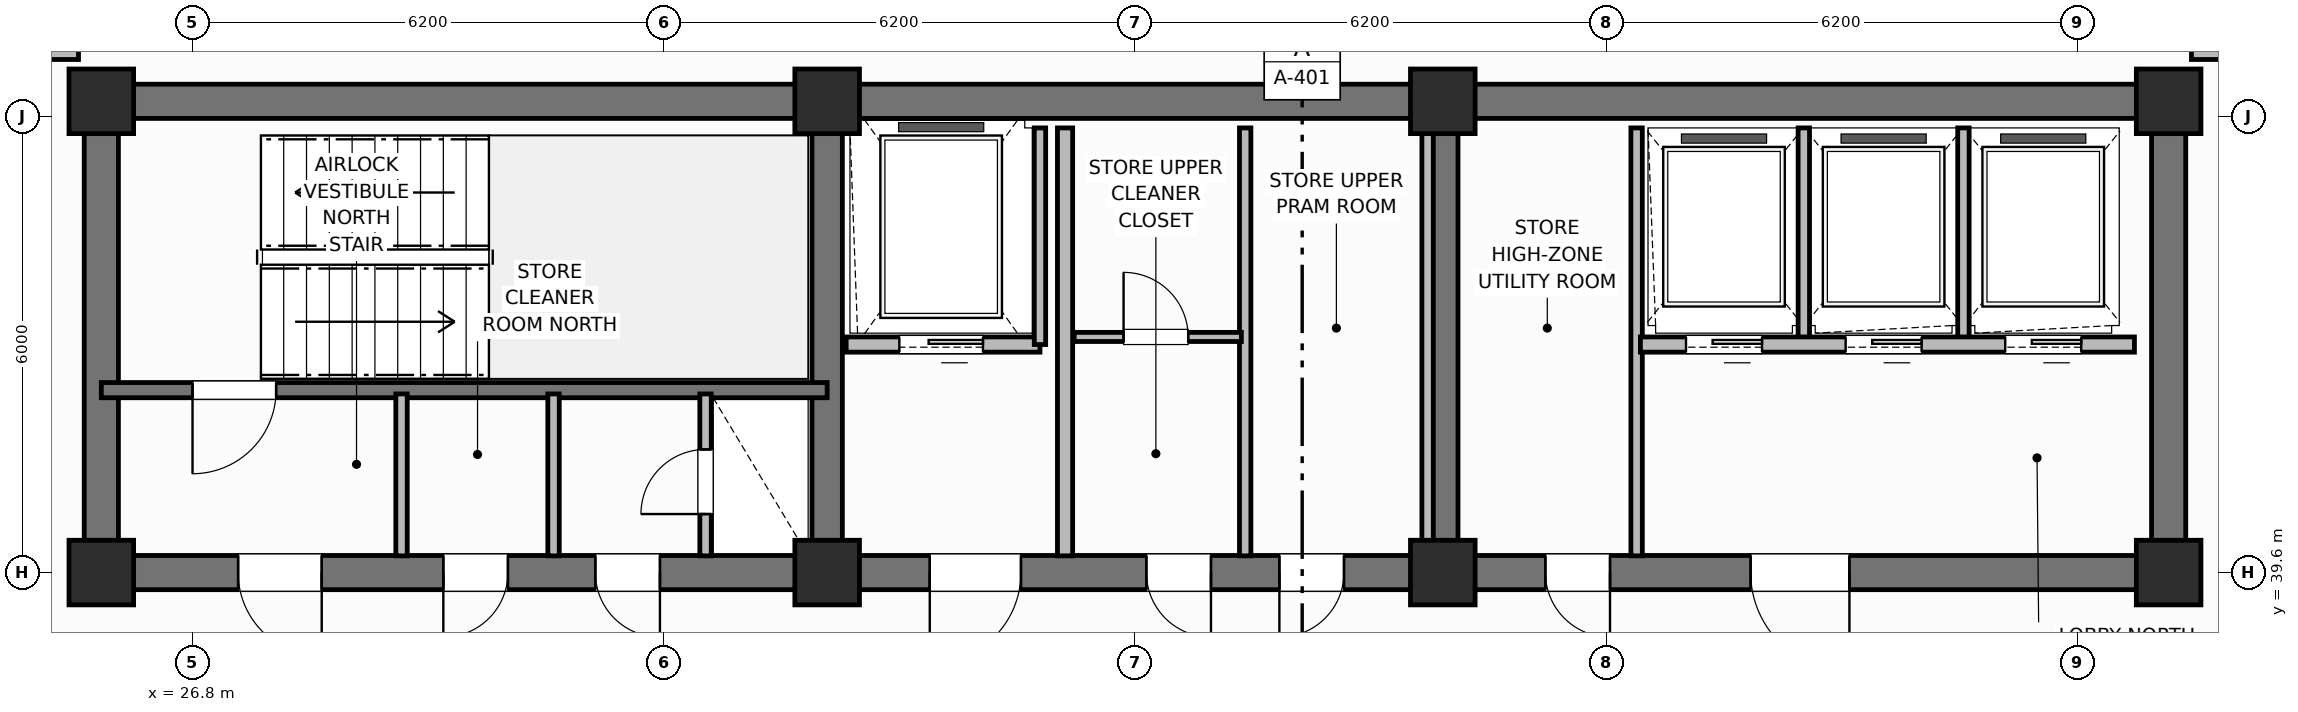
"""IFC4 building model, lengths in metres.
Left out: names, types, materials, properties, quantities, classifications, styles, units other than length and angle.
Written with IfcOpenShell. Run it as: python <this file> out.ifc"""

import sys

from ifc_helpers import new_model, si_unit, direction, frame, frame_2d, origin, origin_2d, place, context, subcontext, project, spatial, rectangle, extrude, element, fill, save


model = new_model("IFC4")
c1 = context("Model", 3, precision=1e-05, world=origin(), true_north=direction((0.0, 1.0)))
c2 = subcontext(c1, "Body", "Model", "MODEL_VIEW")
j1 = project(units=[si_unit("LENGTHUNIT", "METRE"), si_unit("PLANEANGLEUNIT", "RADIAN")], contexts=[c1])
p1 = place(None, origin())
s1 = spatial("IfcSite", under=j1, at=p1, CompositionType="ELEMENT")
p2 = place(p1, origin())
s2 = spatial("IfcBuilding", under=s1, at=p2, CompositionType="ELEMENT")
p3 = place(p2, frame((0.0, 0.0, 240.6)))
s3 = spatial("IfcBuildingStorey", under=s2, at=p3, CompositionType="ELEMENT", Elevation=240.6)
p4 = place(p3, frame((25.6, 45.8, 0.0), z_axis=(0.0, 0.0, 1.0), x_axis=(1.0, 0.0, 0.0)))
e1 = element("IfcWall", 1, at=p4, inside=s3, PredefinedType="SHEAR", context=c2, shape_type="SweptSolid", body=[
    extrude(rectangle(XDim=27.2, YDim=0.45, at=frame_2d((13.6, 0.0))), origin(), (0.0, 0.0, 1.0), 3.7),
])
for number, where, z_axis, x_axis in (
    (2, (25.6, 39.825, 0.0), (0.0, 0.0, 1.0), (0.0, 1.0, 0.0)),
    (3, (52.8, 39.825, 0.0), (0.0, 0.0, 1.0), (0.0, 1.0, 0.0)),
):
    element("IfcWall", number, at=place(p3, frame(where, z_axis=z_axis, x_axis=x_axis)), inside=s3, PredefinedType="SHEAR", context=c2, shape_type="SweptSolid", body=[
        extrude(rectangle(XDim=5.75, YDim=0.45, at=frame_2d((2.875, 0.0))), origin(), (0.0, 0.0, 1.0), 3.7),
    ])
p5 = place(p3, frame((52.8, 39.6, 0.0), z_axis=(0.0, 0.0, 1.0), x_axis=(-1.0, 0.0, 0.0)))
e4 = element("IfcWall", 4, at=p5, inside=s3, PredefinedType="SHEAR", context=c2, shape_type="SweptSolid", body=[
    extrude(rectangle(XDim=27.2, YDim=0.45, at=frame_2d((13.6, 0.0))), origin(), (0.0, 0.0, 1.0), 3.7),
])
p6 = place(p5, frame((24.3, 0.0, 0.0)))
e5 = element("IfcOpeningElement", 5, at=p6, cuts=e4, PredefinedType="OPENING", context=c2, shape_type="SweptSolid", body=[
    extrude(rectangle(XDim=1.1, YDim=2.15, at=frame_2d((0.55, 1.075))), frame((0.0, 0.235, 0.0), z_axis=(0.0, -1.0, 0.0), x_axis=(1.0, 0.0, 0.0)), (0.0, 0.0, 1.0), 0.47),
])
p7 = place(p5, frame((21.85, 0.0, 0.0)))
e6 = element("IfcOpeningElement", 6, at=p7, cuts=e4, PredefinedType="OPENING", context=c2, shape_type="SweptSolid", body=[
    extrude(rectangle(XDim=0.85, YDim=2.1, at=frame_2d((0.425, 1.05))), frame((0.0, 0.235, 0.0), z_axis=(0.0, -1.0, 0.0), x_axis=(1.0, 0.0, 0.0)), (0.0, 0.0, 1.0), 0.47),
])
p8 = place(p5, frame((19.85, 0.0, 0.0)))
e7 = element("IfcOpeningElement", 7, at=p8, cuts=e4, PredefinedType="OPENING", context=c2, shape_type="SweptSolid", body=[
    extrude(rectangle(XDim=0.85, YDim=2.1, at=frame_2d((0.425, 1.05))), frame((0.0, 0.235, 0.0), z_axis=(0.0, -1.0, 0.0), x_axis=(1.0, 0.0, 0.0)), (0.0, 0.0, 1.0), 0.47),
])
p9 = place(p5, frame((15.1, 0.0, 0.0)))
e8 = element("IfcOpeningElement", 8, at=p9, cuts=e4, PredefinedType="OPENING", context=c2, shape_type="SweptSolid", body=[
    extrude(rectangle(XDim=1.2, YDim=2.15, at=frame_2d((0.6, 1.075))), frame((0.0, 0.235, 0.0), z_axis=(0.0, -1.0, 0.0), x_axis=(1.0, 0.0, 0.0)), (0.0, 0.0, 1.0), 0.47),
])
p10 = place(p5, frame((12.6, 0.0, 0.0)))
e9 = element("IfcOpeningElement", 9, at=p10, cuts=e4, PredefinedType="OPENING", context=c2, shape_type="SweptSolid", body=[
    extrude(rectangle(XDim=0.85, YDim=2.1, at=frame_2d((0.425, 1.05))), frame((0.0, 0.235, 0.0), z_axis=(0.0, -1.0, 0.0), x_axis=(1.0, 0.0, 0.0)), (0.0, 0.0, 1.0), 0.47),
])
p11 = place(p5, frame((10.85, 0.0, 0.0)))
e10 = element("IfcOpeningElement", 10, at=p11, cuts=e4, PredefinedType="OPENING", context=c2, shape_type="SweptSolid", body=[
    extrude(rectangle(XDim=0.85, YDim=2.1, at=frame_2d((0.425, 1.05))), frame((0.0, 0.235, 0.0), z_axis=(0.0, -1.0, 0.0), x_axis=(1.0, 0.0, 0.0)), (0.0, 0.0, 1.0), 0.47),
])
p12 = place(p5, frame((7.35, 0.0, 0.0)))
e11 = element("IfcOpeningElement", 11, at=p12, cuts=e4, PredefinedType="OPENING", context=c2, shape_type="SweptSolid", body=[
    extrude(rectangle(XDim=0.85, YDim=2.1, at=frame_2d((0.425, 1.05))), frame((0.0, 0.235, 0.0), z_axis=(0.0, -1.0, 0.0), x_axis=(1.0, 0.0, 0.0)), (0.0, 0.0, 1.0), 0.47),
])
p13 = place(p5, frame((4.2, 0.0, 0.0)))
e12 = element("IfcOpeningElement", 12, at=p13, cuts=e4, PredefinedType="OPENING", context=c2, shape_type="SweptSolid", body=[
    extrude(rectangle(XDim=1.3, YDim=2.2, at=frame_2d((0.65, 1.1))), frame((0.0, 0.235, 0.0), z_axis=(0.0, -1.0, 0.0), x_axis=(1.0, 0.0, 0.0)), (0.0, 0.0, 1.0), 0.47),
])
for number, where, z_axis, x_axis in (
    (13, (35.15, 39.825, 0.0), (0.0, 0.0, 1.0), (0.0, 1.0, 0.0)),
    (14, (43.25, 39.825, 0.0), (0.0, 0.0, 1.0), (0.0, 1.0, 0.0)),
):
    element("IfcWall", number, at=place(p3, frame(where, z_axis=z_axis, x_axis=x_axis)), inside=s3, PredefinedType="SHEAR", context=c2, shape_type="SweptSolid", body=[
        extrude(rectangle(XDim=5.75, YDim=0.4, at=frame_2d((2.875, 0.0))), origin(), (0.0, 0.0, 1.0), 3.7),
    ])
for number, where, z_axis, x_axis in (
    (15, (25.6, 39.6, 0.0), (0.0, 0.0, 1.0), (1.0, 0.0, 0.0)),
    (16, (25.6, 45.8, 0.0), (0.0, 0.0, 1.0), (1.0, 0.0, 0.0)),
    (17, (35.15, 39.6, 0.0), (0.0, 0.0, 1.0), (1.0, 0.0, 0.0)),
    (18, (35.15, 45.8, 0.0), (0.0, 0.0, 1.0), (1.0, 0.0, 0.0)),
    (19, (43.25, 39.6, 0.0), (0.0, 0.0, 1.0), (1.0, 0.0, 0.0)),
    (20, (43.25, 45.8, 0.0), (0.0, 0.0, 1.0), (1.0, 0.0, 0.0)),
    (21, (52.8, 39.6, 0.0), (0.0, 0.0, 1.0), (1.0, 0.0, 0.0)),
    (22, (52.8, 45.8, 0.0), (0.0, 0.0, 1.0), (1.0, 0.0, 0.0)),
):
    element("IfcColumn", number, at=place(p3, frame(where, z_axis=z_axis, x_axis=x_axis)), inside=s3, PredefinedType="COLUMN", context=c2, shape_type="SweptSolid", body=[
        extrude(rectangle(XDim=0.85, YDim=0.85, at=origin_2d()), origin(), (0.0, 0.0, 1.0), 3.7),
    ])
p14 = place(p3, frame((35.15, 42.0, 0.0), z_axis=(0.0, 0.0, 1.0), x_axis=(-1.0, 0.0, 0.0)))
e23 = element("IfcWall", 23, at=p14, inside=s3, PredefinedType="SHEAR", context=c2, shape_type="SweptSolid", body=[
    extrude(rectangle(XDim=9.55, YDim=0.2, at=frame_2d((4.775, 0.0))), origin(), (0.0, 0.0, 1.0), 3.7),
])
p15 = place(p14, frame((7.25, 0.0, 0.0)))
e24 = element("IfcOpeningElement", 24, at=p15, cuts=e23, PredefinedType="OPENING", context=c2, shape_type="SweptSolid", body=[
    extrude(rectangle(XDim=1.1, YDim=2.15, at=frame_2d((0.55, 1.075))), frame((0.0, 0.11, 0.0), z_axis=(0.0, -1.0, 0.0), x_axis=(1.0, 0.0, 0.0)), (0.0, 0.0, 1.0), 0.22),
])
p16 = place(p3, frame((33.55, 39.82, 0.0), z_axis=(0.0, 0.0, 1.0), x_axis=(0.0, 1.0, 0.0)))
e25 = element("IfcWall", 25, at=p16, inside=s3, PredefinedType="PARTITIONING", context=c2, shape_type="SweptSolid", body=[
    extrude(rectangle(XDim=2.13, YDim=0.15, at=frame_2d((1.065, 0.0))), origin(), (0.0, 0.0, 1.0), 2.56),
])
p17 = place(p16, frame((0.55, 0.0, 0.0)))
e26 = element("IfcOpeningElement", 26, at=p17, cuts=e25, PredefinedType="OPENING", context=c2, shape_type="SweptSolid", body=[
    extrude(rectangle(XDim=0.85, YDim=2.05, at=frame_2d((0.425, 1.025))), frame((0.0, 0.085, 0.0), z_axis=(0.0, -1.0, 0.0), x_axis=(1.0, 0.0, 0.0)), (0.0, 0.0, 1.0), 0.17),
])
for number, where, z_axis, x_axis in (
    (27, (29.55, 39.82, 0.0), (0.0, 0.0, 1.0), (0.0, 1.0, 0.0)),
    (28, (31.55, 39.82, 0.0), (0.0, 0.0, 1.0), (0.0, 1.0, 0.0)),
):
    element("IfcWall", number, at=place(p3, frame(where, z_axis=z_axis, x_axis=x_axis)), inside=s3, PredefinedType="PARTITIONING", context=c2, shape_type="SweptSolid", body=[
        extrude(rectangle(XDim=2.13, YDim=0.15, at=frame_2d((1.065, 0.0))), origin(), (0.0, 0.0, 1.0), 2.56),
    ])
p18 = place(p3, frame((37.95, 42.6, 0.0), z_axis=(0.0, 0.0, 1.0), x_axis=(-1.0, 0.0, 0.0)))
e29 = element("IfcWall", 29, at=p18, inside=s3, PredefinedType="PARTITIONING", context=c2, shape_type="SweptSolid", body=[
    extrude(rectangle(XDim=2.55, YDim=0.2, at=frame_2d((1.275, 0.0))), origin(), (0.0, 0.0, 1.0), 2.33),
])
p19 = place(p18, frame((0.75, 0.0, 0.0)))
e30 = element("IfcOpeningElement", 30, at=p19, cuts=e29, PredefinedType="OPENING", context=c2, shape_type="SweptSolid", body=[
    extrude(rectangle(XDim=1.1, YDim=2.15, at=frame_2d((0.55, 1.075))), frame((0.0, 0.11, 0.0), z_axis=(0.0, -1.0, 0.0), x_axis=(1.0, 0.0, 0.0)), (0.0, 0.0, 1.0), 0.22),
])
p20 = place(p3, frame((37.95, 42.6, 0.0), z_axis=(0.0, 0.0, 1.0), x_axis=(0.0, 1.0, 0.0)))
e31 = element("IfcWall", 31, at=p20, inside=s3, PredefinedType="PARTITIONING", context=c2, shape_type="SweptSolid", body=[
    extrude(rectangle(XDim=2.85, YDim=0.15, at=frame_2d((1.425, 0.0))), origin(), (0.0, 0.0, 1.0), 2.56),
])
p21 = place(p3, frame((38.28, 39.82, 0.0), z_axis=(0.0, 0.0, 1.0), x_axis=(0.0, 1.0, 0.0)))
e32 = element("IfcWall", 32, at=p21, inside=s3, PredefinedType="PARTITIONING", context=c2, shape_type="SweptSolid", body=[
    extrude(rectangle(XDim=5.63, YDim=0.2, at=frame_2d((2.815, 0.0))), origin(), (0.0, 0.0, 1.0), 2.56),
])
for number, where, z_axis, x_axis in (
    (33, (43.05, 39.82, 0.0), (0.0, 0.0, 1.0), (0.0, 1.0, 0.0)),
    (34, (40.65, 39.82, 0.0), (0.0, 0.0, 1.0), (0.0, 1.0, 0.0)),
):
    element("IfcWall", number, at=place(p3, frame(where, z_axis=z_axis, x_axis=x_axis)), inside=s3, PredefinedType="PARTITIONING", context=c2, shape_type="SweptSolid", body=[
        extrude(rectangle(XDim=5.63, YDim=0.15, at=frame_2d((2.815, 0.0))), origin(), (0.0, 0.0, 1.0), 2.56),
    ])
p22 = place(p3, frame((38.4, 42.7, 0.0), z_axis=(0.0, 0.0, 1.0), x_axis=(1.0, 0.0, 0.0)))
e35 = element("IfcWall", 35, at=p22, inside=s3, PredefinedType="PARTITIONING", context=c2, shape_type="SweptSolid", body=[
    extrude(rectangle(XDim=2.2, YDim=0.12, at=frame_2d((1.1, 0.0))), origin(), (0.0, 0.0, 1.0), 2.33),
])
p23 = place(p22, frame((0.65, 0.0, 0.0)))
e36 = element("IfcOpeningElement", 36, at=p23, cuts=e35, PredefinedType="OPENING", context=c2, shape_type="SweptSolid", body=[
    extrude(rectangle(XDim=0.85, YDim=2.1, at=frame_2d((0.425, 1.05))), frame((0.0, 0.07, 0.0), z_axis=(0.0, -1.0, 0.0), x_axis=(1.0, 0.0, 0.0)), (0.0, 0.0, 1.0), 0.14),
])
p24 = place(p3, frame((45.8, 39.82, 0.0), z_axis=(0.0, 0.0, 1.0), x_axis=(0.0, 1.0, 0.0)))
e37 = element("IfcWall", 37, at=p24, inside=s3, PredefinedType="PARTITIONING", context=c2, shape_type="SweptSolid", body=[
    extrude(rectangle(XDim=5.63, YDim=0.15, at=frame_2d((2.815, 0.0))), origin(), (0.0, 0.0, 1.0), 2.56),
])
for number, where, z_axis, x_axis in (
    (38, (48.0, 42.65, 0.0), (0.0, 0.0, 1.0), (0.0, 1.0, 0.0)),
    (39, (50.1, 42.65, 0.0), (0.0, 0.0, 1.0), (0.0, 1.0, 0.0)),
):
    element("IfcWall", number, at=place(p3, frame(where, z_axis=z_axis, x_axis=x_axis)), inside=s3, PredefinedType="PARTITIONING", context=c2, shape_type="SweptSolid", body=[
        extrude(rectangle(XDim=2.8, YDim=0.15, at=frame_2d((1.4, 0.0))), origin(), (0.0, 0.0, 1.0), 2.56),
    ])
p25 = place(p3, frame((52.35, 42.6, 0.0), z_axis=(0.0, 0.0, 1.0), x_axis=(-1.0, 0.0, 0.0)))
e40 = element("IfcWall", 40, at=p25, inside=s3, PredefinedType="PARTITIONING", context=c2, shape_type="SweptSolid", body=[
    extrude(rectangle(XDim=6.5, YDim=0.2, at=frame_2d((3.25, 0.0))), origin(), (0.0, 0.0, 1.0), 2.56),
])
p26 = place(p25, frame((4.9, 0.0, 0.0)))
e41 = element("IfcOpeningElement", 41, at=p26, cuts=e40, PredefinedType="OPENING", context=c2, shape_type="SweptSolid", body=[
    extrude(rectangle(XDim=1.0, YDim=2.15, at=frame_2d((0.5, 1.075))), frame((0.0, 0.11, 0.0), z_axis=(0.0, -1.0, 0.0), x_axis=(1.0, 0.0, 0.0)), (0.0, 0.0, 1.0), 0.22),
])
p27 = place(p25, frame((2.8, 0.0, 0.0)))
e42 = element("IfcOpeningElement", 42, at=p27, cuts=e40, PredefinedType="OPENING", context=c2, shape_type="SweptSolid", body=[
    extrude(rectangle(XDim=1.0, YDim=2.15, at=frame_2d((0.5, 1.075))), frame((0.0, 0.11, 0.0), z_axis=(0.0, -1.0, 0.0), x_axis=(1.0, 0.0, 0.0)), (0.0, 0.0, 1.0), 0.22),
])
p28 = place(p25, frame((0.7, 0.0, 0.0)))
e43 = element("IfcOpeningElement", 43, at=p28, cuts=e40, PredefinedType="OPENING", context=c2, shape_type="SweptSolid", body=[
    extrude(rectangle(XDim=1.0, YDim=2.15, at=frame_2d((0.5, 1.075))), frame((0.0, 0.11, 0.0), z_axis=(0.0, -1.0, 0.0), x_axis=(1.0, 0.0, 0.0)), (0.0, 0.0, 1.0), 0.22),
])
p29 = place(p3, frame((21.546, 46.45, 0.0), z_axis=(0.0, 0.0, 1.0), x_axis=(1.0, 0.0, 0.0)))
e44 = element("IfcWall", 44, at=p29, inside=s3, PredefinedType="PARTITIONING", context=c2, shape_type="SweptSolid", body=[
    extrude(rectangle(XDim=3.754, YDim=0.2, at=frame_2d((1.877, 0.0))), origin(), (0.0, 0.0, 1.0), 2.56),
])
p30 = place(p3, frame((53.1, 46.45, 0.0), z_axis=(0.0, 0.0, 1.0), x_axis=(1.0, 0.0, 0.0)))
e45 = element("IfcWall", 45, at=p30, inside=s3, PredefinedType="PARTITIONING", context=c2, shape_type="SweptSolid", body=[
    extrude(rectangle(XDim=3.754, YDim=0.2, at=frame_2d((1.877, 0.0))), origin(), (0.0, 0.0, 1.0), 2.56),
])
p31 = place(p15, origin())
e46 = element("IfcDoor", 46, at=p31, inside=s3, OperationType="SINGLE_SWING_RIGHT", PredefinedType="DOOR", context=c2, shape_type="SweptSolid", body=[
    extrude(rectangle(XDim=1.1, YDim=2.15, at=frame_2d((0.55, 1.075))), frame((0.0, 0.025, 0.0), z_axis=(0.0, -1.0, 0.0), x_axis=(1.0, 0.0, 0.0)), (0.0, 0.0, 1.0), 0.05),
])
fill(e24, e46)
p32 = place(p17, origin())
e47 = element("IfcDoor", 47, at=p32, inside=s3, OperationType="SINGLE_SWING_LEFT", PredefinedType="TRAPDOOR", context=c2, shape_type="SweptSolid", body=[
    extrude(rectangle(XDim=0.85, YDim=2.05, at=frame_2d((0.425, 1.025))), frame((0.0, 0.025, 0.0), z_axis=(0.0, -1.0, 0.0), x_axis=(1.0, 0.0, 0.0)), (0.0, 0.0, 1.0), 0.05),
])
fill(e26, e47)
p33 = place(p19, origin())
e48 = element("IfcDoor", 48, at=p33, inside=s3, OperationType="SLIDING_TO_LEFT", PredefinedType="DOOR", context=c2, shape_type="SweptSolid", body=[
    extrude(rectangle(XDim=1.1, YDim=2.15, at=frame_2d((0.55, 1.075))), frame((0.0, 0.025, 0.0), z_axis=(0.0, -1.0, 0.0), x_axis=(1.0, 0.0, 0.0)), (0.0, 0.0, 1.0), 0.05),
])
fill(e30, e48)
p34 = place(p23, origin())
e49 = element("IfcDoor", 49, at=p34, inside=s3, OperationType="SINGLE_SWING_LEFT", PredefinedType="DOOR", context=c2, shape_type="SweptSolid", body=[
    extrude(rectangle(XDim=0.85, YDim=2.1, at=frame_2d((0.425, 1.05))), frame((0.0, 0.025, 0.0), z_axis=(0.0, -1.0, 0.0), x_axis=(1.0, 0.0, 0.0)), (0.0, 0.0, 1.0), 0.05),
])
fill(e36, e49)
p35 = place(p26, origin())
e50 = element("IfcDoor", 50, at=p35, inside=s3, OperationType="SLIDING_TO_LEFT", PredefinedType="DOOR", context=c2, shape_type="SweptSolid", body=[
    extrude(rectangle(XDim=1.0, YDim=2.15, at=frame_2d((0.5, 1.075))), frame((0.0, 0.025, 0.0), z_axis=(0.0, -1.0, 0.0), x_axis=(1.0, 0.0, 0.0)), (0.0, 0.0, 1.0), 0.05),
])
fill(e41, e50)
p36 = place(p27, origin())
e51 = element("IfcDoor", 51, at=p36, inside=s3, OperationType="SLIDING_TO_LEFT", PredefinedType="DOOR", context=c2, shape_type="SweptSolid", body=[
    extrude(rectangle(XDim=1.0, YDim=2.15, at=frame_2d((0.5, 1.075))), frame((0.0, 0.025, 0.0), z_axis=(0.0, -1.0, 0.0), x_axis=(1.0, 0.0, 0.0)), (0.0, 0.0, 1.0), 0.05),
])
fill(e42, e51)
p37 = place(p28, origin())
e52 = element("IfcDoor", 52, at=p37, inside=s3, OperationType="SLIDING_TO_LEFT", PredefinedType="DOOR", context=c2, shape_type="SweptSolid", body=[
    extrude(rectangle(XDim=1.0, YDim=2.15, at=frame_2d((0.5, 1.075))), frame((0.0, 0.025, 0.0), z_axis=(0.0, -1.0, 0.0), x_axis=(1.0, 0.0, 0.0)), (0.0, 0.0, 1.0), 0.05),
])
fill(e43, e52)
p38 = place(p6, origin())
e53 = element("IfcDoor", 53, at=p38, inside=s3, OperationType="SINGLE_SWING_LEFT", PredefinedType="DOOR", context=c2, shape_type="SweptSolid", body=[
    extrude(rectangle(XDim=1.1, YDim=2.15, at=frame_2d((0.55, 1.075))), frame((0.0, 0.025, 0.0), z_axis=(0.0, -1.0, 0.0), x_axis=(1.0, 0.0, 0.0)), (0.0, 0.0, 1.0), 0.05),
])
fill(e5, e53)
p39 = place(p7, origin())
e54 = element("IfcDoor", 54, at=p39, inside=s3, OperationType="SINGLE_SWING_RIGHT", PredefinedType="DOOR", context=c2, shape_type="SweptSolid", body=[
    extrude(rectangle(XDim=0.85, YDim=2.1, at=frame_2d((0.425, 1.05))), frame((0.0, 0.025, 0.0), z_axis=(0.0, -1.0, 0.0), x_axis=(1.0, 0.0, 0.0)), (0.0, 0.0, 1.0), 0.05),
])
fill(e6, e54)
p40 = place(p8, origin())
e55 = element("IfcDoor", 55, at=p40, inside=s3, OperationType="SINGLE_SWING_LEFT", PredefinedType="DOOR", context=c2, shape_type="SweptSolid", body=[
    extrude(rectangle(XDim=0.85, YDim=2.1, at=frame_2d((0.425, 1.05))), frame((0.0, 0.025, 0.0), z_axis=(0.0, -1.0, 0.0), x_axis=(1.0, 0.0, 0.0)), (0.0, 0.0, 1.0), 0.05),
])
fill(e7, e55)
p41 = place(p9, origin())
e56 = element("IfcDoor", 56, at=p41, inside=s3, OperationType="SINGLE_SWING_RIGHT", PredefinedType="DOOR", context=c2, shape_type="SweptSolid", body=[
    extrude(rectangle(XDim=1.2, YDim=2.15, at=frame_2d((0.6, 1.075))), frame((0.0, 0.025, 0.0), z_axis=(0.0, -1.0, 0.0), x_axis=(1.0, 0.0, 0.0)), (0.0, 0.0, 1.0), 0.05),
])
fill(e8, e56)
p42 = place(p10, origin())
e57 = element("IfcDoor", 57, at=p42, inside=s3, OperationType="SINGLE_SWING_LEFT", PredefinedType="DOOR", context=c2, shape_type="SweptSolid", body=[
    extrude(rectangle(XDim=0.85, YDim=2.1, at=frame_2d((0.425, 1.05))), frame((0.0, 0.025, 0.0), z_axis=(0.0, -1.0, 0.0), x_axis=(1.0, 0.0, 0.0)), (0.0, 0.0, 1.0), 0.05),
])
fill(e9, e57)
p43 = place(p11, origin())
e58 = element("IfcDoor", 58, at=p43, inside=s3, OperationType="SINGLE_SWING_RIGHT", PredefinedType="DOOR", context=c2, shape_type="SweptSolid", body=[
    extrude(rectangle(XDim=0.85, YDim=2.1, at=frame_2d((0.425, 1.05))), frame((0.0, 0.025, 0.0), z_axis=(0.0, -1.0, 0.0), x_axis=(1.0, 0.0, 0.0)), (0.0, 0.0, 1.0), 0.05),
])
fill(e10, e58)
p44 = place(p12, origin())
e59 = element("IfcDoor", 59, at=p44, inside=s3, OperationType="SINGLE_SWING_LEFT", PredefinedType="DOOR", context=c2, shape_type="SweptSolid", body=[
    extrude(rectangle(XDim=0.85, YDim=2.1, at=frame_2d((0.425, 1.05))), frame((0.0, 0.025, 0.0), z_axis=(0.0, -1.0, 0.0), x_axis=(1.0, 0.0, 0.0)), (0.0, 0.0, 1.0), 0.05),
])
fill(e11, e59)
p45 = place(p13, origin())
e60 = element("IfcDoor", 60, at=p45, inside=s3, OperationType="SINGLE_SWING_LEFT", PredefinedType="DOOR", context=c2, shape_type="SweptSolid", body=[
    extrude(rectangle(XDim=1.3, YDim=2.2, at=frame_2d((0.65, 1.1))), frame((0.0, 0.025, 0.0), z_axis=(0.0, -1.0, 0.0), x_axis=(1.0, 0.0, 0.0)), (0.0, 0.0, 1.0), 0.05),
])
fill(e12, e60)
save(model, sys.argv[1])
